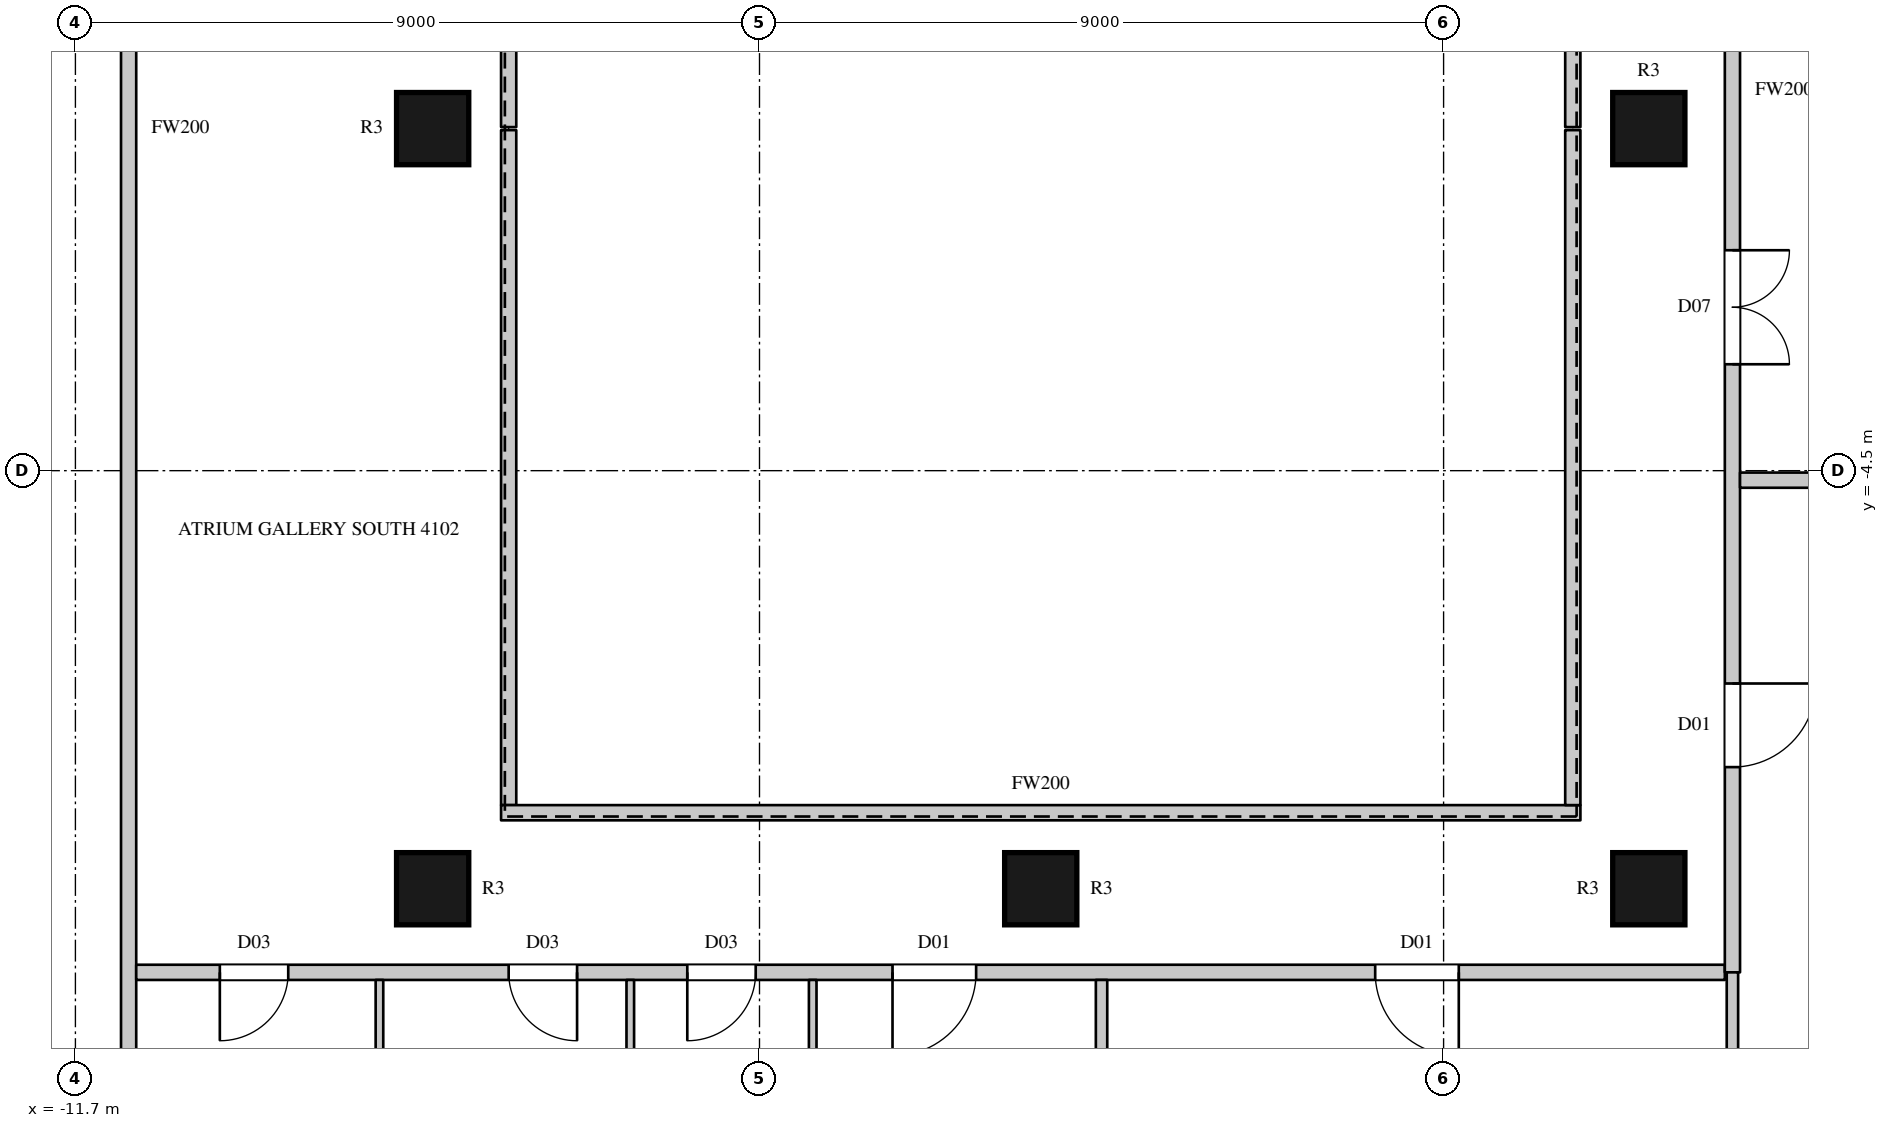
"""IFC4 building model, lengths in metres.
Left out: names, types, materials, properties, quantities, classifications, styles, units other than length and angle.
Written with IfcOpenShell. Run it as: python <this file> out.ifc"""

import sys

from ifc_helpers import new_model, si_unit, direction, frame, frame_2d, origin, origin_2d, place, context, subcontext, project, spatial, rectangle, circle, extrude, element, fill, save


model = new_model("IFC4")
c1 = context("Model", 3, precision=1e-05, world=origin(), true_north=direction((0.0, 1.0)))
c2 = subcontext(c1, "Body", "Model", "MODEL_VIEW")
j1 = project(units=[si_unit("LENGTHUNIT", "METRE"), si_unit("PLANEANGLEUNIT", "RADIAN")], contexts=[c1])
p1 = place(None, origin())
s1 = spatial("IfcSite", under=j1, at=p1, CompositionType="ELEMENT")
p2 = place(p1, origin())
s2 = spatial("IfcBuilding", under=s1, at=p2, CompositionType="ELEMENT")
p3 = place(p2, frame((0.0, 0.0, 189.2)))
s3 = spatial("IfcBuildingStorey", under=s2, at=p3, CompositionType="ELEMENT", Elevation=189.2)
for number, where, z_axis, x_axis in (
    (1, (-7.0, -10.0, 0.0), (0.0, 0.0, 1.0), (1.0, 0.0, 0.0)),
    (2, (-7.0, 0.0, 0.0), (0.0, 0.0, 1.0), (1.0, 0.0, 0.0)),
    (3, (1.0, -10.0, 0.0), (0.0, 0.0, 1.0), (1.0, 0.0, 0.0)),
    (4, (9.0, -10.0, 0.0), (0.0, 0.0, 1.0), (1.0, 0.0, 0.0)),
    (5, (9.0, 0.0, 0.0), (0.0, 0.0, 1.0), (1.0, 0.0, 0.0)),
):
    element("IfcColumn", number, at=place(p3, frame(where, z_axis=z_axis, x_axis=x_axis)), inside=s3, PredefinedType="COLUMN", context=c2, shape_type="SweptSolid", body=[
        extrude(circle(Radius=0.475, at=origin_2d()), origin(), (0.0, 0.0, 1.0), 4.1),
    ])
p4 = place(p3, frame((-11.0, -14.8, 0.0), z_axis=(0.0, 0.0, 1.0), x_axis=(0.0, 1.0, 0.0)))
e6 = element("IfcWall", 6, at=p4, inside=s3, PredefinedType="PARTITIONING", context=c2, shape_type="SweptSolid", body=[
    extrude(rectangle(XDim=29.6, YDim=0.2, at=frame_2d((14.8, 0.0))), origin(), (0.0, 0.0, 1.0), 3.8),
])
p5 = place(p4, frame((20.15, 0.0, 0.0)))
e7 = element("IfcOpeningElement", 7, at=p5, cuts=e6, PredefinedType="OPENING", context=c2, shape_type="SweptSolid", body=[
    extrude(rectangle(XDim=1.5, YDim=2.4, at=frame_2d((0.75, 1.2))), frame((0.0, 0.11, 0.0), z_axis=(0.0, -1.0, 0.0), x_axis=(1.0, 0.0, 0.0)), (0.0, 0.0, 1.0), 0.22),
])
p6 = place(p3, frame((-10.9, -11.1, 0.0), z_axis=(0.0, 0.0, 1.0), x_axis=(1.0, 0.0, 0.0)))
e8 = element("IfcWall", 8, at=p6, inside=s3, PredefinedType="PARTITIONING", context=c2, shape_type="SweptSolid", body=[
    extrude(rectangle(XDim=20.9, YDim=0.2, at=frame_2d((10.45, 0.0))), origin(), (0.0, 0.0, 1.0), 3.8),
])
p7 = place(p6, frame((1.1, 0.0, 0.0)))
e9 = element("IfcOpeningElement", 9, at=p7, cuts=e8, PredefinedType="OPENING", context=c2, shape_type="SweptSolid", body=[
    extrude(rectangle(XDim=0.9, YDim=2.2, at=frame_2d((0.45, 1.1))), frame((0.0, 0.11, 0.0), z_axis=(0.0, -1.0, 0.0), x_axis=(1.0, 0.0, 0.0)), (0.0, 0.0, 1.0), 0.22),
])
p8 = place(p6, frame((4.9, 0.0, 0.0)))
e10 = element("IfcOpeningElement", 10, at=p8, cuts=e8, PredefinedType="OPENING", context=c2, shape_type="SweptSolid", body=[
    extrude(rectangle(XDim=0.9, YDim=2.2, at=frame_2d((0.45, 1.1))), frame((0.0, 0.11, 0.0), z_axis=(0.0, -1.0, 0.0), x_axis=(1.0, 0.0, 0.0)), (0.0, 0.0, 1.0), 0.22),
])
p9 = place(p6, frame((7.25, 0.0, 0.0)))
e11 = element("IfcOpeningElement", 11, at=p9, cuts=e8, PredefinedType="OPENING", context=c2, shape_type="SweptSolid", body=[
    extrude(rectangle(XDim=0.9, YDim=2.2, at=frame_2d((0.45, 1.1))), frame((0.0, 0.11, 0.0), z_axis=(0.0, -1.0, 0.0), x_axis=(1.0, 0.0, 0.0)), (0.0, 0.0, 1.0), 0.22),
])
p10 = place(p6, frame((9.95, 0.0, 0.0)))
e12 = element("IfcOpeningElement", 12, at=p10, cuts=e8, PredefinedType="OPENING", context=c2, shape_type="SweptSolid", body=[
    extrude(rectangle(XDim=1.1, YDim=2.4, at=frame_2d((0.55, 1.2))), frame((0.0, 0.11, 0.0), z_axis=(0.0, -1.0, 0.0), x_axis=(1.0, 0.0, 0.0)), (0.0, 0.0, 1.0), 0.22),
])
p11 = place(p6, frame((16.3, 0.0, 0.0)))
e13 = element("IfcOpeningElement", 13, at=p11, cuts=e8, PredefinedType="OPENING", context=c2, shape_type="SweptSolid", body=[
    extrude(rectangle(XDim=1.1, YDim=2.4, at=frame_2d((0.55, 1.2))), frame((0.0, 0.11, 0.0), z_axis=(0.0, -1.0, 0.0), x_axis=(1.0, 0.0, 0.0)), (0.0, 0.0, 1.0), 0.22),
])
p12 = place(p3, frame((-6.0, -8.9, 0.0), z_axis=(0.0, 0.0, 1.0), x_axis=(0.0, 1.0, 0.0)))
e14 = element("IfcWall", 14, at=p12, inside=s3, PredefinedType="PARTITIONING", context=c2, shape_type="SweptSolid", body=[
    extrude(rectangle(XDim=8.88, YDim=0.2, at=frame_2d((4.44, 0.0))), origin(), (0.0, 0.0, 1.0), 3.8),
])
p13 = place(p3, frame((-6.1, -9.0, 0.0), z_axis=(0.0, 0.0, 1.0), x_axis=(1.0, 0.0, 0.0)))
e15 = element("IfcWall", 15, at=p13, inside=s3, PredefinedType="PARTITIONING", context=c2, shape_type="SweptSolid", body=[
    extrude(rectangle(XDim=14.2, YDim=0.2, at=frame_2d((7.1, 0.0))), origin(), (0.0, 0.0, 1.0), 3.8),
])
for number, where, z_axis, x_axis in (
    (16, (-6.0, 0.02, 0.0), (0.0, 0.0, 1.0), (0.0, 1.0, 0.0)),
    (17, (8.0, -8.9, 0.0), (0.0, 0.0, 1.0), (0.0, 1.0, 0.0)),
    (18, (8.0, 0.02, 0.0), (0.0, 0.0, 1.0), (0.0, 1.0, 0.0)),
):
    element("IfcWall", number, at=place(p3, frame(where, z_axis=z_axis, x_axis=x_axis)), inside=s3, PredefinedType="PARTITIONING", context=c2, shape_type="SweptSolid", body=[
        extrude(rectangle(XDim=8.88, YDim=0.2, at=frame_2d((4.44, 0.0))), origin(), (0.0, 0.0, 1.0), 3.8),
    ])
p14 = place(p3, frame((10.1, -11.1, 0.0), z_axis=(0.0, 0.0, 1.0), x_axis=(0.0, 1.0, 0.0)))
e19 = element("IfcWall", 19, at=p14, inside=s3, PredefinedType="PARTITIONING", context=c2, shape_type="SweptSolid", body=[
    extrude(rectangle(XDim=23.2, YDim=0.2, at=frame_2d((11.6, 0.0))), origin(), (0.0, 0.0, 1.0), 3.8),
])
p15 = place(p14, frame((8.0, 0.0, 0.0)))
e20 = element("IfcOpeningElement", 20, at=p15, cuts=e19, PredefinedType="OPENING", context=c2, shape_type="SweptSolid", body=[
    extrude(rectangle(XDim=1.5, YDim=2.4, at=frame_2d((0.75, 1.2))), frame((0.0, 0.11, 0.0), z_axis=(0.0, -1.0, 0.0), x_axis=(1.0, 0.0, 0.0)), (0.0, 0.0, 1.0), 0.22),
])
p16 = place(p14, frame((18.95, 0.0, 0.0)))
e21 = element("IfcOpeningElement", 21, at=p16, cuts=e19, PredefinedType="OPENING", context=c2, shape_type="SweptSolid", body=[
    extrude(rectangle(XDim=1.1, YDim=2.4, at=frame_2d((0.55, 1.2))), frame((0.0, 0.11, 0.0), z_axis=(0.0, -1.0, 0.0), x_axis=(1.0, 0.0, 0.0)), (0.0, 0.0, 1.0), 0.22),
])
p17 = place(p14, frame((2.7, 0.0, 0.0)))
e22 = element("IfcOpeningElement", 22, at=p17, cuts=e19, PredefinedType="OPENING", context=c2, shape_type="SweptSolid", body=[
    extrude(rectangle(XDim=1.1, YDim=2.4, at=frame_2d((0.55, 1.2))), frame((0.0, 0.11, 0.0), z_axis=(0.0, -1.0, 0.0), x_axis=(1.0, 0.0, 0.0)), (0.0, 0.0, 1.0), 0.22),
])
p18 = place(p3, frame((10.2, -4.625, 0.0), z_axis=(0.0, 0.0, 1.0), x_axis=(1.0, 0.0, 0.0)))
e23 = element("IfcWall", 23, at=p18, inside=s3, PredefinedType="PARTITIONING", context=c2, shape_type="SweptSolid", body=[
    extrude(rectangle(XDim=4.475, YDim=0.2, at=frame_2d((2.238, 0.0))), origin(), (0.0, 0.0, 1.0), 3.8),
])
p19 = place(p3, frame((1.8, -16.7, 0.0), z_axis=(0.0, 0.0, 1.0), x_axis=(0.0, 1.0, 0.0)))
e24 = element("IfcWall", 24, at=p19, inside=s3, PredefinedType="PARTITIONING", context=c2, shape_type="SweptSolid", body=[
    extrude(rectangle(XDim=5.5, YDim=0.15, at=frame_2d((2.75, 0.0))), origin(), (0.0, 0.0, 1.0), 3.15),
])
p20 = place(p3, frame((10.1, -16.7, 0.0), z_axis=(0.0, 0.0, 1.0), x_axis=(0.0, 1.0, 0.0)))
e25 = element("IfcWall", 25, at=p20, inside=s3, PredefinedType="PARTITIONING", context=c2, shape_type="SweptSolid", body=[
    extrude(rectangle(XDim=5.6, YDim=0.15, at=frame_2d((2.8, 0.0))), origin(), (0.0, 0.0, 1.0), 3.8),
])
for number, where, z_axis, x_axis in (
    (26, (-7.7, -16.7, 0.0), (0.0, 0.0, 1.0), (0.0, 1.0, 0.0)),
    (27, (-4.4, -16.7, 0.0), (0.0, 0.0, 1.0), (0.0, 1.0, 0.0)),
    (28, (-2.0, -16.7, 0.0), (0.0, 0.0, 1.0), (0.0, 1.0, 0.0)),
):
    element("IfcWall", number, at=place(p3, frame(where, z_axis=z_axis, x_axis=x_axis)), inside=s3, PredefinedType="PARTITIONING", context=c2, shape_type="SweptSolid", body=[
        extrude(rectangle(XDim=5.5, YDim=0.1, at=frame_2d((2.75, 0.0))), origin(), (0.0, 0.0, 1.0), 3.8),
    ])
p21 = place(p15, origin())
e29 = element("IfcDoor", 29, at=p21, inside=s3, OperationType="DOUBLE_DOOR_SINGLE_SWING", PredefinedType="DOOR", context=c2, shape_type="SweptSolid", body=[
    extrude(rectangle(XDim=1.5, YDim=2.4, at=frame_2d((0.75, 1.2))), frame((0.0, 0.025, 0.0), z_axis=(0.0, -1.0, 0.0), x_axis=(1.0, 0.0, 0.0)), (0.0, 0.0, 1.0), 0.05),
])
fill(e20, e29)
p22 = place(p7, origin())
e30 = element("IfcDoor", 30, at=p22, inside=s3, OperationType="SINGLE_SWING_RIGHT", PredefinedType="DOOR", context=c2, shape_type="SweptSolid", body=[
    extrude(rectangle(XDim=0.9, YDim=2.2, at=frame_2d((0.45, 1.1))), frame((0.0, 0.025, 0.0), z_axis=(0.0, -1.0, 0.0), x_axis=(1.0, 0.0, 0.0)), (0.0, 0.0, 1.0), 0.05),
])
fill(e9, e30)
p23 = place(p8, origin())
e31 = element("IfcDoor", 31, at=p23, inside=s3, OperationType="SINGLE_SWING_LEFT", PredefinedType="DOOR", context=c2, shape_type="SweptSolid", body=[
    extrude(rectangle(XDim=0.9, YDim=2.2, at=frame_2d((0.45, 1.1))), frame((0.0, 0.025, 0.0), z_axis=(0.0, -1.0, 0.0), x_axis=(1.0, 0.0, 0.0)), (0.0, 0.0, 1.0), 0.05),
])
fill(e10, e31)
p24 = place(p9, origin())
e32 = element("IfcDoor", 32, at=p24, inside=s3, OperationType="SINGLE_SWING_RIGHT", PredefinedType="DOOR", context=c2, shape_type="SweptSolid", body=[
    extrude(rectangle(XDim=0.9, YDim=2.2, at=frame_2d((0.45, 1.1))), frame((0.0, 0.025, 0.0), z_axis=(0.0, -1.0, 0.0), x_axis=(1.0, 0.0, 0.0)), (0.0, 0.0, 1.0), 0.05),
])
fill(e11, e32)
p25 = place(p10, origin())
e33 = element("IfcDoor", 33, at=p25, inside=s3, OperationType="SINGLE_SWING_RIGHT", PredefinedType="DOOR", context=c2, shape_type="SweptSolid", body=[
    extrude(rectangle(XDim=1.1, YDim=2.4, at=frame_2d((0.55, 1.2))), frame((0.0, 0.025, 0.0), z_axis=(0.0, -1.0, 0.0), x_axis=(1.0, 0.0, 0.0)), (0.0, 0.0, 1.0), 0.05),
])
fill(e12, e33)
p26 = place(p11, origin())
e34 = element("IfcDoor", 34, at=p26, inside=s3, OperationType="SINGLE_SWING_LEFT", PredefinedType="DOOR", context=c2, shape_type="SweptSolid", body=[
    extrude(rectangle(XDim=1.1, YDim=2.4, at=frame_2d((0.55, 1.2))), frame((0.0, 0.025, 0.0), z_axis=(0.0, -1.0, 0.0), x_axis=(1.0, 0.0, 0.0)), (0.0, 0.0, 1.0), 0.05),
])
fill(e13, e34)
p27 = place(p17, origin())
e35 = element("IfcDoor", 35, at=p27, inside=s3, OperationType="SINGLE_SWING_LEFT", PredefinedType="DOOR", context=c2, shape_type="SweptSolid", body=[
    extrude(rectangle(XDim=1.1, YDim=2.4, at=frame_2d((0.55, 1.2))), frame((0.0, 0.025, 0.0), z_axis=(0.0, -1.0, 0.0), x_axis=(1.0, 0.0, 0.0)), (0.0, 0.0, 1.0), 0.05),
])
fill(e22, e35)
save(model, sys.argv[1])
